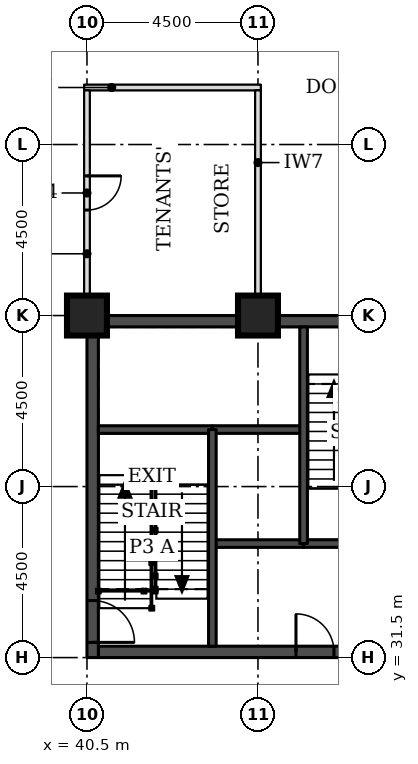
"""IFC4 building model, lengths in metres.
Left out: names, types, materials, properties, quantities, classifications, styles, units other than length and angle.
Written with IfcOpenShell. Run it as: python <this file> out.ifc"""

import sys

from ifc_helpers import new_model, si_unit, direction, frame, frame_2d, origin, origin_2d, place, context, subcontext, project, spatial, rectangle, extrude, element, fill, save


model = new_model("IFC4")
c1 = context("Model", 3, precision=1e-05, world=origin(), true_north=direction((0.0, 1.0)))
c2 = subcontext(c1, "Body", "Model", "MODEL_VIEW")
j1 = project(units=[si_unit("LENGTHUNIT", "METRE"), si_unit("PLANEANGLEUNIT", "RADIAN")], contexts=[c1])
p1 = place(None, origin())
s1 = spatial("IfcSite", under=j1, at=p1, CompositionType="ELEMENT")
p2 = place(p1, origin())
s2 = spatial("IfcBuilding", under=s1, at=p2, CompositionType="ELEMENT")
p3 = place(p2, frame((0.0, 0.0, 97.4)))
s3 = spatial("IfcBuildingStorey", under=s2, at=p3, CompositionType="ELEMENT", Elevation=97.4)
for number, where, z_axis, x_axis in (
    (1, (40.5, 40.5, 0.0), (0.0, 0.0, 1.0), (1.0, 0.0, 0.0)),
    (2, (45.0, 40.5, 0.0), (0.0, 0.0, 1.0), (1.0, 0.0, 0.0)),
):
    element("IfcColumn", number, at=place(p3, frame(where, z_axis=z_axis, x_axis=x_axis)), inside=s3, PredefinedType="COLUMN", context=c2, shape_type="SweptSolid", body=[
        extrude(rectangle(XDim=1.05, YDim=1.05, at=origin_2d()), origin(), (0.0, 0.0, 1.0), 3.7),
    ])
p4 = place(p3, frame((40.8, 31.65, 0.0), z_axis=(0.0, 0.0, 1.0), x_axis=(1.0, 0.0, 0.0)))
e3 = element("IfcWall", 3, at=p4, inside=s3, PredefinedType="SHEAR", context=c2, shape_type="SweptSolid", body=[
    extrude(rectangle(XDim=8.4, YDim=0.3, at=frame_2d((4.2, 0.0))), origin(), (0.0, 0.0, 1.0), 3.7),
])
p5 = place(p4, frame((5.2, 0.0, 0.0)))
e4 = element("IfcOpeningElement", 4, at=p5, cuts=e3, PredefinedType="OPENING", context=c2, shape_type="SweptSolid", body=[
    extrude(rectangle(XDim=1.0, YDim=2.1, at=frame_2d((0.5, 1.05))), frame((0.0, 0.16, 0.0), z_axis=(0.0, -1.0, 0.0), x_axis=(1.0, 0.0, 0.0)), (0.0, 0.0, 1.0), 0.32),
])
p6 = place(p3, frame((40.8, 40.35, 0.0), z_axis=(0.0, 0.0, 1.0), x_axis=(1.0, 0.0, 0.0)))
e5 = element("IfcWall", 5, at=p6, inside=s3, PredefinedType="SHEAR", context=c2, shape_type="SweptSolid", body=[
    extrude(rectangle(XDim=8.4, YDim=0.3, at=frame_2d((4.2, 0.0))), origin(), (0.0, 0.0, 1.0), 3.7),
])
p7 = place(p6, frame((6.4, 0.0, 0.0)))
e6 = element("IfcOpeningElement", 6, at=p7, cuts=e5, PredefinedType="OPENING", context=c2, shape_type="SweptSolid", body=[
    extrude(rectangle(XDim=1.1, YDim=2.1, at=frame_2d((0.55, 1.05))), frame((0.0, 0.16, 0.0), z_axis=(0.0, -1.0, 0.0), x_axis=(1.0, 0.0, 0.0)), (0.0, 0.0, 1.0), 0.32),
])
p8 = place(p3, frame((40.65, 31.5, 0.0), z_axis=(0.0, 0.0, 1.0), x_axis=(0.0, 1.0, 0.0)))
e7 = element("IfcWall", 7, at=p8, inside=s3, PredefinedType="SHEAR", context=c2, shape_type="SweptSolid", body=[
    extrude(rectangle(XDim=9.0, YDim=0.3, at=frame_2d((4.5, 0.0))), origin(), (0.0, 0.0, 1.0), 3.7),
])
p9 = place(p8, frame((0.4, 0.0, 0.0)))
e8 = element("IfcOpeningElement", 8, at=p9, cuts=e7, PredefinedType="OPENING", context=c2, shape_type="SweptSolid", body=[
    extrude(rectangle(XDim=1.1, YDim=2.1, at=frame_2d((0.55, 1.05))), frame((0.0, 0.16, 0.0), z_axis=(0.0, -1.0, 0.0), x_axis=(1.0, 0.0, 0.0)), (0.0, 0.0, 1.0), 0.32),
])
p10 = place(p3, frame((40.425, 46.5, 0.0), z_axis=(0.0, 0.0, 1.0), x_axis=(1.0, 0.0, 0.0)))
e9 = element("IfcWall", 9, at=p10, inside=s3, PredefinedType="PARTITIONING", context=c2, shape_type="SweptSolid", body=[
    extrude(rectangle(XDim=4.65, YDim=0.15, at=frame_2d((2.325, 0.0))), origin(), (0.0, 0.0, 1.0), 3.55),
])
p11 = place(p3, frame((40.5, 41.025, 0.0), z_axis=(0.0, 0.0, 1.0), x_axis=(0.0, 1.0, 0.0)))
e10 = element("IfcWall", 10, at=p11, inside=s3, PredefinedType="PARTITIONING", context=c2, shape_type="SweptSolid", body=[
    extrude(rectangle(XDim=5.4, YDim=0.15, at=frame_2d((2.7, 0.0))), origin(), (0.0, 0.0, 1.0), 3.55),
])
p12 = place(p11, frame((2.25, 0.0, 0.0)))
e11 = element("IfcOpeningElement", 11, at=p12, cuts=e10, PredefinedType="OPENING", context=c2, shape_type="SweptSolid", body=[
    extrude(rectangle(XDim=0.9, YDim=2.1, at=frame_2d((0.45, 1.05))), frame((0.0, 0.085, 0.0), z_axis=(0.0, -1.0, 0.0), x_axis=(1.0, 0.0, 0.0)), (0.0, 0.0, 1.0), 0.17),
])
p13 = place(p3, frame((45.0, 41.025, 0.0), z_axis=(0.0, 0.0, 1.0), x_axis=(0.0, 1.0, 0.0)))
e12 = element("IfcWall", 12, at=p13, inside=s3, PredefinedType="PARTITIONING", context=c2, shape_type="SweptSolid", body=[
    extrude(rectangle(XDim=5.4, YDim=0.15, at=frame_2d((2.7, 0.0))), origin(), (0.0, 0.0, 1.0), 3.55),
])
p14 = place(p3, frame((43.8, 34.5, 0.0), z_axis=(0.0, 0.0, 1.0), x_axis=(1.0, 0.0, 0.0)))
e13 = element("IfcWall", 13, at=p14, inside=s3, PredefinedType="SOLIDWALL", context=c2, shape_type="SweptSolid", body=[
    extrude(rectangle(XDim=2.4, YDim=0.2, at=frame_2d((1.2, 0.0))), origin(), (0.0, 0.0, 1.0), 3.55),
])
p15 = place(p3, frame((46.2, 34.5, 0.0), z_axis=(0.0, 0.0, 1.0), x_axis=(1.0, 0.0, 0.0)))
e14 = element("IfcWall", 14, at=p15, inside=s3, PredefinedType="SOLIDWALL", context=c2, shape_type="SweptSolid", body=[
    extrude(rectangle(XDim=3.0, YDim=0.2, at=frame_2d((1.5, 0.0))), origin(), (0.0, 0.0, 1.0), 3.55),
])
p16 = place(p3, frame((43.8, 37.5, 0.0), z_axis=(0.0, 0.0, 1.0), x_axis=(1.0, 0.0, 0.0)))
e15 = element("IfcWall", 15, at=p16, inside=s3, PredefinedType="SOLIDWALL", context=c2, shape_type="SweptSolid", body=[
    extrude(rectangle(XDim=2.4, YDim=0.2, at=frame_2d((1.2, 0.0))), origin(), (0.0, 0.0, 1.0), 3.7),
])
p17 = place(p3, frame((40.8, 37.5, 0.0), z_axis=(0.0, 0.0, 1.0), x_axis=(1.0, 0.0, 0.0)))
e16 = element("IfcWall", 16, at=p17, inside=s3, PredefinedType="SOLIDWALL", context=c2, shape_type="SweptSolid", body=[
    extrude(rectangle(XDim=3.0, YDim=0.2, at=frame_2d((1.5, 0.0))), origin(), (0.0, 0.0, 1.0), 3.55),
])
for number, where, z_axis, x_axis in (
    (17, (43.8, 31.8, 0.0), (0.0, 0.0, 1.0), (0.0, 1.0, 0.0)),
    (18, (46.2, 34.5, 0.0), (0.0, 0.0, 1.0), (0.0, 1.0, 0.0)),
):
    element("IfcWall", number, at=place(p3, frame(where, z_axis=z_axis, x_axis=x_axis)), inside=s3, PredefinedType="SOLIDWALL", context=c2, shape_type="SweptSolid", body=[
        extrude(rectangle(XDim=5.7, YDim=0.2, at=frame_2d((2.85, 0.0))), origin(), (0.0, 0.0, 1.0), 3.55),
    ])
p18 = place(p12, frame((0.9, 0.0, 0.0), z_axis=(0.0, 0.0, 1.0), x_axis=(-1.0, 0.0, 0.0)))
e19 = element("IfcDoor", 19, at=p18, inside=s3, OperationType="SINGLE_SWING_LEFT", PredefinedType="DOOR", context=c2, shape_type="SweptSolid", body=[
    extrude(rectangle(XDim=0.9, YDim=2.1, at=frame_2d((0.45, 1.05))), frame((0.0, 0.025, 0.0), z_axis=(0.0, -1.0, 0.0), x_axis=(1.0, 0.0, 0.0)), (0.0, 0.0, 1.0), 0.05),
])
fill(e11, e19)
p19 = place(p9, frame((1.1, 0.0, 0.0), z_axis=(0.0, 0.0, 1.0), x_axis=(-1.0, 0.0, 0.0)))
e20 = element("IfcDoor", 20, at=p19, inside=s3, OperationType="SINGLE_SWING_RIGHT", PredefinedType="DOOR", context=c2, shape_type="SweptSolid", body=[
    extrude(rectangle(XDim=1.1, YDim=2.1, at=frame_2d((0.55, 1.05))), frame((0.0, 0.025, 0.0), z_axis=(0.0, -1.0, 0.0), x_axis=(1.0, 0.0, 0.0)), (0.0, 0.0, 1.0), 0.05),
])
fill(e8, e20)
p20 = place(p5, origin())
e21 = element("IfcDoor", 21, at=p20, inside=s3, OperationType="SINGLE_SWING_LEFT", PredefinedType="DOOR", context=c2, shape_type="SweptSolid", body=[
    extrude(rectangle(XDim=1.0, YDim=2.1, at=frame_2d((0.5, 1.05))), frame((0.0, 0.025, 0.0), z_axis=(0.0, -1.0, 0.0), x_axis=(1.0, 0.0, 0.0)), (0.0, 0.0, 1.0), 0.05),
])
fill(e4, e21)
save(model, sys.argv[1])
